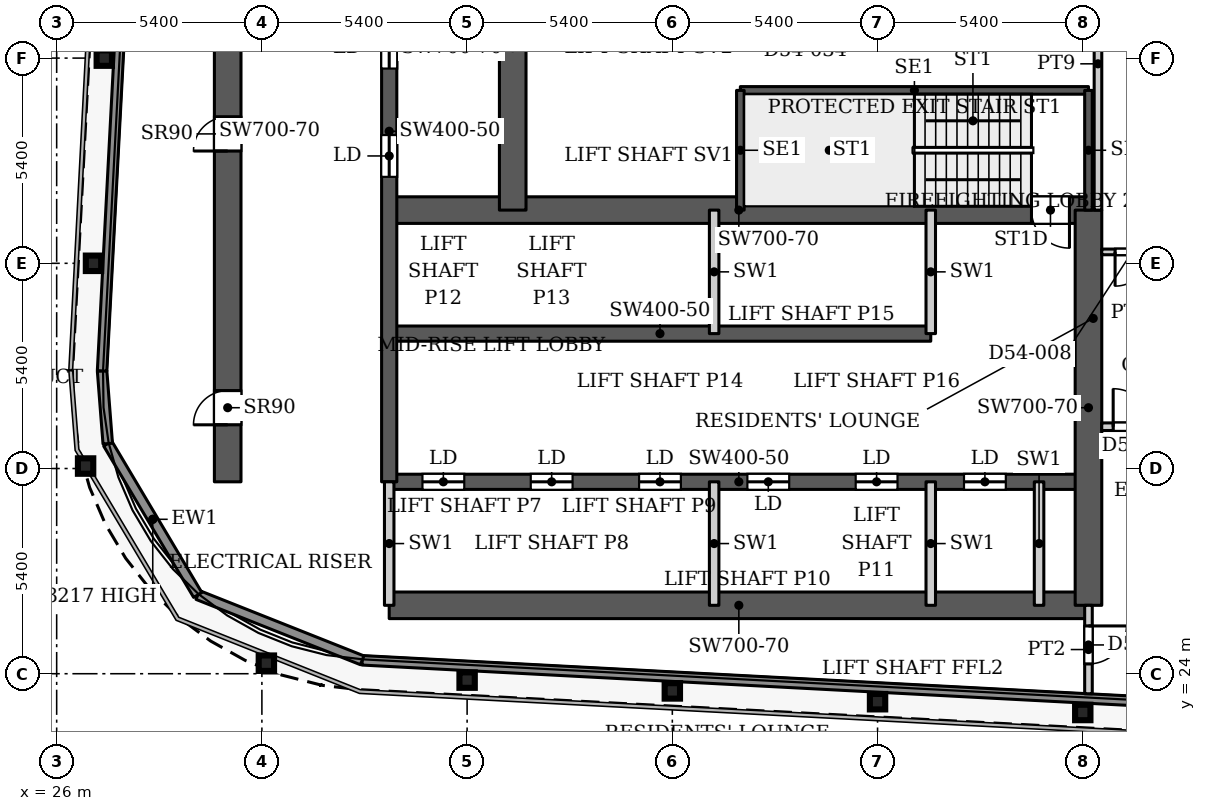
"""IFC4 building model, lengths in metres.
Left out: names, types, materials, properties, quantities, classifications, styles, units other than length and angle.
Written with IfcOpenShell. Run it as: python <this file> out.ifc"""

import sys

from ifc_helpers import new_model, si_unit, direction, frame, frame_2d, origin, origin_2d, place, context, subcontext, project, spatial, rectangle, i_section, extrude, source, transform, mapped, element, fill, save


model = new_model("IFC4")
c1 = context("Model", 3, precision=1e-05, world=origin(), true_north=direction((0.0, 1.0)))
c2 = subcontext(c1, "Body", "Model", "MODEL_VIEW")
j1 = project(units=[si_unit("LENGTHUNIT", "METRE"), si_unit("PLANEANGLEUNIT", "RADIAN")], contexts=[c1])
p1 = place(None, origin())
s1 = spatial("IfcSite", under=j1, at=p1, CompositionType="ELEMENT")
p2 = place(p1, origin())
s2 = spatial("IfcBuilding", under=s1, at=p2, CompositionType="ELEMENT")
p3 = place(p2, frame((0.0, 0.0, 231.8)))
s3 = spatial("IfcBuildingStorey", under=s2, at=p3, CompositionType="ELEMENT", Elevation=231.8)
for number, where, z_axis, x_axis in (
    (1, (53.0, 22.98, 0.0), (0.0, 0.0, 1.0), (1.0, 0.0, 0.0)),
    (2, (47.6, 23.264, 0.0), (0.0, 0.0, 1.0), (1.0, 0.0, 0.0)),
    (3, (42.2, 23.548, 0.0), (0.0, 0.0, 1.0), (1.0, 0.0, 0.0)),
    (4, (36.8, 23.832, 0.0), (0.0, 0.0, 1.0), (1.0, 0.0, 0.0)),
    (5, (31.518, 24.277, 0.0), (0.0, 0.0, 1.0), (1.0, 0.0, 0.0)),
    (6, (26.761, 29.465, 0.0), (0.0, 0.0, 1.0), (1.0, 0.0, 0.0)),
    (7, (26.969, 34.8, 0.0), (0.0, 0.0, 1.0), (1.0, 0.0, 0.0)),
    (8, (27.253, 40.2, 0.0), (0.0, 0.0, 1.0), (1.0, 0.0, 0.0)),
):
    element("IfcColumn", number, at=place(p3, frame(where, z_axis=z_axis, x_axis=x_axis)), inside=s3, PredefinedType="COLUMN", context=c2, shape_type="SweptSolid", body=[
        extrude(i_section(OverallWidth=0.404, OverallDepth=0.407, WebThickness=0.027, FlangeThickness=0.044, FilletRadius=0.012, at=origin_2d()), origin(), (0.0, 0.0, 1.0), 3.9),
    ])
p4 = place(p3, frame((34.75, 25.8, 0.0), z_axis=(0.0, 0.0, 1.0), x_axis=(1.0, 0.0, 0.0)))
e9 = element("IfcWall", 9, at=p4, inside=s3, PredefinedType="SHEAR", context=c2, shape_type="SweptSolid", body=[
    extrude(rectangle(XDim=18.4, YDim=0.7, at=frame_2d((9.2, 0.0))), origin(), (0.0, 0.0, 1.0), 3.9),
])
p5 = place(p3, frame((34.75, 29.05, 0.0), z_axis=(0.0, 0.0, 1.0), x_axis=(1.0, 0.0, 0.0)))
e10 = element("IfcWall", 10, at=p5, inside=s3, PredefinedType="SHEAR", context=c2, shape_type="SweptSolid", body=[
    extrude(rectangle(XDim=18.4, YDim=0.4, at=frame_2d((9.2, 0.0))), origin(), (0.0, 0.0, 1.0), 3.9),
])
p6 = place(p5, frame((0.875, 0.0, 0.0)))
e11 = element("IfcOpeningElement", 11, at=p6, cuts=e10, PredefinedType="OPENING", context=c2, shape_type="SweptSolid", body=[
    extrude(rectangle(XDim=1.1, YDim=2.2, at=frame_2d((0.55, 1.1))), frame((0.0, 0.21, 0.0), z_axis=(0.0, -1.0, 0.0), x_axis=(1.0, 0.0, 0.0)), (0.0, 0.0, 1.0), 0.42),
])
p7 = place(p5, frame((3.725, 0.0, 0.0)))
e12 = element("IfcOpeningElement", 12, at=p7, cuts=e10, PredefinedType="OPENING", context=c2, shape_type="SweptSolid", body=[
    extrude(rectangle(XDim=1.1, YDim=2.2, at=frame_2d((0.55, 1.1))), frame((0.0, 0.21, 0.0), z_axis=(0.0, -1.0, 0.0), x_axis=(1.0, 0.0, 0.0)), (0.0, 0.0, 1.0), 0.42),
])
p8 = place(p5, frame((6.575, 0.0, 0.0)))
e13 = element("IfcOpeningElement", 13, at=p8, cuts=e10, PredefinedType="OPENING", context=c2, shape_type="SweptSolid", body=[
    extrude(rectangle(XDim=1.1, YDim=2.2, at=frame_2d((0.55, 1.1))), frame((0.0, 0.21, 0.0), z_axis=(0.0, -1.0, 0.0), x_axis=(1.0, 0.0, 0.0)), (0.0, 0.0, 1.0), 0.42),
])
p9 = place(p5, frame((9.425, 0.0, 0.0)))
e14 = element("IfcOpeningElement", 14, at=p9, cuts=e10, PredefinedType="OPENING", context=c2, shape_type="SweptSolid", body=[
    extrude(rectangle(XDim=1.1, YDim=2.2, at=frame_2d((0.55, 1.1))), frame((0.0, 0.21, 0.0), z_axis=(0.0, -1.0, 0.0), x_axis=(1.0, 0.0, 0.0)), (0.0, 0.0, 1.0), 0.42),
])
p10 = place(p5, frame((12.275, 0.0, 0.0)))
e15 = element("IfcOpeningElement", 15, at=p10, cuts=e10, PredefinedType="OPENING", context=c2, shape_type="SweptSolid", body=[
    extrude(rectangle(XDim=1.1, YDim=2.2, at=frame_2d((0.55, 1.1))), frame((0.0, 0.21, 0.0), z_axis=(0.0, -1.0, 0.0), x_axis=(1.0, 0.0, 0.0)), (0.0, 0.0, 1.0), 0.42),
])
p11 = place(p5, frame((15.125, 0.0, 0.0)))
e16 = element("IfcOpeningElement", 16, at=p11, cuts=e10, PredefinedType="OPENING", context=c2, shape_type="SweptSolid", body=[
    extrude(rectangle(XDim=1.1, YDim=2.2, at=frame_2d((0.55, 1.1))), frame((0.0, 0.21, 0.0), z_axis=(0.0, -1.0, 0.0), x_axis=(1.0, 0.0, 0.0)), (0.0, 0.0, 1.0), 0.42),
])
p12 = place(p3, frame((34.75, 32.95, 0.0), z_axis=(0.0, 0.0, 1.0), x_axis=(1.0, 0.0, 0.0)))
e17 = element("IfcWall", 17, at=p12, inside=s3, PredefinedType="SHEAR", context=c2, shape_type="SweptSolid", body=[
    extrude(rectangle(XDim=14.25, YDim=0.4, at=frame_2d((7.125, 0.0))), origin(), (0.0, 0.0, 1.0), 3.9),
])
p13 = place(p3, frame((34.75, 36.2, 0.0), z_axis=(0.0, 0.0, 1.0), x_axis=(1.0, 0.0, 0.0)))
e18 = element("IfcWall", 18, at=p13, inside=s3, PredefinedType="SHEAR", context=c2, shape_type="SweptSolid", body=[
    extrude(rectangle(XDim=18.4, YDim=0.7, at=frame_2d((9.2, 0.0))), origin(), (0.0, 0.0, 1.0), 3.9),
])
p14 = place(p13, frame((16.9, 0.0, 0.0)))
e19 = element("IfcOpeningElement", 19, at=p14, cuts=e18, PredefinedType="OPENING", context=c2, shape_type="SweptSolid", body=[
    extrude(rectangle(XDim=1.0, YDim=2.2, at=frame_2d((0.5, 1.1))), frame((0.0, 0.36, 0.0), z_axis=(0.0, -1.0, 0.0), x_axis=(1.0, 0.0, 0.0)), (0.0, 0.0, 1.0), 0.72),
])
p15 = place(p3, frame((34.75, 29.05, 0.0), z_axis=(0.0, 0.0, 1.0), x_axis=(0.0, 1.0, 0.0)))
e20 = element("IfcWall", 20, at=p15, inside=s3, PredefinedType="SHEAR", context=c2, shape_type="SweptSolid", body=[
    extrude(rectangle(XDim=18.45, YDim=0.4, at=frame_2d((9.225, 0.0))), origin(), (0.0, 0.0, 1.0), 3.9),
])
p16 = place(p15, frame((8.025, 0.0, 0.0)))
e21 = element("IfcOpeningElement", 21, at=p16, cuts=e20, PredefinedType="OPENING", context=c2, shape_type="SweptSolid", body=[
    extrude(rectangle(XDim=1.1, YDim=2.2, at=frame_2d((0.55, 1.1))), frame((0.0, 0.21, 0.0), z_axis=(0.0, -1.0, 0.0), x_axis=(1.0, 0.0, 0.0)), (0.0, 0.0, 1.0), 0.42),
])
p17 = place(p15, frame((10.875, 0.0, 0.0)))
e22 = element("IfcOpeningElement", 22, at=p17, cuts=e20, PredefinedType="OPENING", context=c2, shape_type="SweptSolid", body=[
    extrude(rectangle(XDim=1.1, YDim=2.2, at=frame_2d((0.55, 1.1))), frame((0.0, 0.21, 0.0), z_axis=(0.0, -1.0, 0.0), x_axis=(1.0, 0.0, 0.0)), (0.0, 0.0, 1.0), 0.42),
])
p18 = place(p15, frame((13.725, 0.0, 0.0)))
e23 = element("IfcOpeningElement", 23, at=p18, cuts=e20, PredefinedType="OPENING", context=c2, shape_type="SweptSolid", body=[
    extrude(rectangle(XDim=1.1, YDim=2.2, at=frame_2d((0.55, 1.1))), frame((0.0, 0.21, 0.0), z_axis=(0.0, -1.0, 0.0), x_axis=(1.0, 0.0, 0.0)), (0.0, 0.0, 1.0), 0.42),
])
p19 = place(p15, frame((15.95, 0.0, 0.0)))
e24 = element("IfcOpeningElement", 24, at=p19, cuts=e20, PredefinedType="OPENING", context=c2, shape_type="SweptSolid", body=[
    extrude(rectangle(XDim=1.1, YDim=2.2, at=frame_2d((0.55, 1.1))), frame((0.0, 0.21, 0.0), z_axis=(0.0, -1.0, 0.0), x_axis=(1.0, 0.0, 0.0)), (0.0, 0.0, 1.0), 0.42),
])
p20 = place(p3, frame((38.0, 36.2, 0.0), z_axis=(0.0, 0.0, 1.0), x_axis=(0.0, 1.0, 0.0)))
e25 = element("IfcWall", 25, at=p20, inside=s3, PredefinedType="SHEAR", context=c2, shape_type="SweptSolid", body=[
    extrude(rectangle(XDim=8.55, YDim=0.7, at=frame_2d((4.275, 0.0))), origin(), (0.0, 0.0, 1.0), 3.9),
])
p21 = place(p3, frame((30.5, 29.05, 0.0), z_axis=(0.0, 0.0, 1.0), x_axis=(0.0, 1.0, 0.0)))
e26 = element("IfcWall", 26, at=p21, inside=s3, PredefinedType="SHEAR", context=c2, shape_type="SweptSolid", body=[
    extrude(rectangle(XDim=18.45, YDim=0.7, at=frame_2d((9.225, 0.0))), origin(), (0.0, 0.0, 1.0), 3.9),
])
p22 = place(p21, frame((1.5, 0.0, 0.0)))
e27 = element("IfcOpeningElement", 27, at=p22, cuts=e26, PredefinedType="OPENING", context=c2, shape_type="SweptSolid", body=[
    extrude(rectangle(XDim=0.9, YDim=2.2, at=frame_2d((0.45, 1.1))), frame((0.0, 0.36, 0.0), z_axis=(0.0, -1.0, 0.0), x_axis=(1.0, 0.0, 0.0)), (0.0, 0.0, 1.0), 0.72),
])
p23 = place(p21, frame((8.705, 0.0, 0.0)))
e28 = element("IfcOpeningElement", 28, at=p23, cuts=e26, PredefinedType="OPENING", context=c2, shape_type="SweptSolid", body=[
    extrude(rectangle(XDim=0.9, YDim=2.2, at=frame_2d((0.45, 1.1))), frame((0.0, 0.36, 0.0), z_axis=(0.0, -1.0, 0.0), x_axis=(1.0, 0.0, 0.0)), (0.0, 0.0, 1.0), 0.72),
])
p24 = place(p3, frame((53.15, 25.8, 0.0), z_axis=(0.0, 0.0, 1.0), x_axis=(0.0, 1.0, 0.0)))
e29 = element("IfcWall", 29, at=p24, inside=s3, PredefinedType="SHEAR", context=c2, shape_type="SweptSolid", body=[
    extrude(rectangle(XDim=10.4, YDim=0.7, at=frame_2d((5.2, 0.0))), origin(), (0.0, 0.0, 1.0), 3.9),
])
p25 = place(p3, frame((84.386, 21.703, 0.0), z_axis=(0.0, 0.0, 1.0), x_axis=(-0.998617508267, 0.05256493302, 0.0)))
e30 = element("IfcWall", 30, at=p25, inside=s3, PredefinedType="SOLIDWALL", context=c2, shape_type="SweptSolid", body=[
    extrude(rectangle(XDim=50.417, YDim=0.25, at=frame_2d((25.208, 0.0))), origin(), (0.0, 0.0, 1.0), 3.75),
])
p26 = place(p3, frame((34.039, 24.353, 0.0), z_axis=(0.0, 0.0, 1.0), x_axis=(-0.929352825399, 0.369192803184, 0.0)))
e31 = element("IfcWall", 31, at=p26, inside=s3, PredefinedType="SOLIDWALL", context=c2, shape_type="SweptSolid", body=[
    extrude(rectangle(XDim=4.656, YDim=0.25, at=frame_2d((2.328, 0.0))), origin(), (0.0, 0.0, 1.0), 3.75),
])
p27 = place(p3, frame((29.712, 26.072, 0.0), z_axis=(0.0, 0.0, 1.0), x_axis=(-0.511028049012, 0.859564036662, 0.0)))
e32 = element("IfcWall", 32, at=p27, inside=s3, PredefinedType="SOLIDWALL", context=c2, shape_type="SweptSolid", body=[
    extrude(rectangle(XDim=4.634, YDim=0.25, at=frame_2d((2.317, 0.0))), origin(), (0.0, 0.0, 1.0), 3.217),
])
p28 = place(p3, frame((27.344, 30.055, 0.0), z_axis=(0.0, 0.0, 1.0), x_axis=(-0.077571675317, 0.99698677784, 0.0)))
e33 = element("IfcWall", 33, at=p28, inside=s3, PredefinedType="SOLIDWALL", context=c2, shape_type="SweptSolid", body=[
    extrude(rectangle(XDim=1.92, YDim=0.25, at=frame_2d((0.96, 0.0))), origin(), (0.0, 0.0, 1.0), 3.75),
])
p29 = place(p3, frame((27.195, 31.969, 0.0), z_axis=(0.0, 0.0, 1.0), x_axis=(0.052555284099, 0.998618016117, 0.0)))
e34 = element("IfcWall", 34, at=p29, inside=s3, PredefinedType="SOLIDWALL", context=c2, shape_type="SweptSolid", body=[
    extrude(rectangle(XDim=61.38, YDim=0.25, at=frame_2d((30.69, 0.0))), origin(), (0.0, 0.0, 1.0), 3.75),
])
p30 = place(p3, frame((43.99, 39.35, 0.0), z_axis=(0.0, 0.0, 1.0), x_axis=(1.0, 0.0, 0.0)))
e35 = element("IfcWall", 35, at=p30, inside=s3, PredefinedType="SHEAR", context=c2, shape_type="SweptSolid", body=[
    extrude(rectangle(XDim=9.16, YDim=0.2, at=frame_2d((4.58, 0.0))), origin(), (0.0, 0.0, 1.0), 3.9),
])
for number, where, z_axis, x_axis in (
    (36, (43.99, 36.2, 0.0), (0.0, 0.0, 1.0), (0.0, 1.0, 0.0)),
    (37, (53.15, 36.2, 0.0), (0.0, 0.0, 1.0), (0.0, 1.0, 0.0)),
):
    element("IfcWall", number, at=place(p3, frame(where, z_axis=z_axis, x_axis=x_axis)), inside=s3, PredefinedType="SHEAR", context=c2, shape_type="SweptSolid", body=[
        extrude(rectangle(XDim=3.15, YDim=0.2, at=frame_2d((1.575, 0.0))), origin(), (0.0, 0.0, 1.0), 3.9),
    ])
for number, where, z_axis, x_axis in (
    (38, (34.75, 25.8, 0.0), (0.0, 0.0, 1.0), (0.0, 1.0, 0.0)),
    (39, (43.3, 25.8, 0.0), (0.0, 0.0, 1.0), (0.0, 1.0, 0.0)),
    (40, (43.3, 32.95, 0.0), (0.0, 0.0, 1.0), (0.0, 1.0, 0.0)),
    (41, (49.0, 25.8, 0.0), (0.0, 0.0, 1.0), (0.0, 1.0, 0.0)),
    (42, (49.0, 32.95, 0.0), (0.0, 0.0, 1.0), (0.0, 1.0, 0.0)),
    (43, (51.85, 25.8, 0.0), (0.0, 0.0, 1.0), (0.0, 1.0, 0.0)),
):
    element("IfcWall", number, at=place(p3, frame(where, z_axis=z_axis, x_axis=x_axis)), inside=s3, PredefinedType="PARTITIONING", context=c2, shape_type="SweptSolid", body=[
        extrude(rectangle(XDim=3.25, YDim=0.25, at=frame_2d((1.625, 0.0))), origin(), (0.0, 0.0, 1.0), 3.9),
    ])
p31 = place(p3, frame((53.15, 23.472, 0.0), z_axis=(0.0, 0.0, 1.0), x_axis=(0.0, 1.0, 0.0)))
e44 = element("IfcWall", 44, at=p31, inside=s3, PredefinedType="PARTITIONING", context=c2, shape_type="SweptSolid", body=[
    extrude(rectangle(XDim=2.328, YDim=0.2, at=frame_2d((1.164, 0.0))), origin(), (0.0, 0.0, 1.0), 3.6),
])
p32 = place(p31, frame((0.785, 0.0, 0.0)))
e45 = element("IfcOpeningElement", 45, at=p32, cuts=e44, PredefinedType="OPENING", context=c2, shape_type="SweptSolid", body=[
    extrude(rectangle(XDim=1.0, YDim=2.1, at=frame_2d((0.5, 1.05))), frame((0.0, 0.11, 0.0), z_axis=(0.0, -1.0, 0.0), x_axis=(1.0, 0.0, 0.0)), (0.0, 0.0, 1.0), 0.22),
])
p33 = place(p3, frame((53.4, 36.199, 0.0), z_axis=(0.0, 0.0, 1.0), x_axis=(0.0, 1.0, 0.0)))
e46 = element("IfcWall", 46, at=p33, inside=s3, PredefinedType="PARTITIONING", context=c2, shape_type="SweptSolid", body=[
    extrude(rectangle(XDim=7.701, YDim=0.2, at=frame_2d((3.851, 0.0))), origin(), (0.0, 0.0, 1.0), 3.6),
])
p34 = place(p3, frame((53.499, 30.5, 0.0), z_axis=(0.0, 0.0, 1.0), x_axis=(1.0, 0.0, 0.0)))
e47 = element("IfcWall", 47, at=p34, inside=s3, PredefinedType="PARTITIONING", context=c2, shape_type="SweptSolid", body=[
    extrude(rectangle(XDim=28.401, YDim=0.2, at=frame_2d((14.2, 0.0))), origin(), (0.0, 0.0, 1.0), 3.6),
])
p35 = place(p34, frame((0.301, 0.0, 0.0)))
e48 = element("IfcOpeningElement", 48, at=p35, cuts=e47, PredefinedType="OPENING", context=c2, shape_type="SweptSolid", body=[
    extrude(rectangle(XDim=1.0, YDim=2.1, at=frame_2d((0.5, 1.05))), frame((0.0, 0.11, 0.0), z_axis=(0.0, -1.0, 0.0), x_axis=(1.0, 0.0, 0.0)), (0.0, 0.0, 1.0), 0.22),
])
p36 = place(p34, frame((18.151, 0.0, 0.0)))
e49 = element("IfcOpeningElement", 49, at=p36, cuts=e47, PredefinedType="OPENING", context=c2, shape_type="SweptSolid", body=[
    extrude(rectangle(XDim=1.0, YDim=2.1, at=frame_2d((0.5, 1.05))), frame((0.0, 0.11, 0.0), z_axis=(0.0, -1.0, 0.0), x_axis=(1.0, 0.0, 0.0)), (0.0, 0.0, 1.0), 0.22),
])
p37 = place(p34, frame((25.801, 0.0, 0.0)))
e50 = element("IfcOpeningElement", 50, at=p37, cuts=e47, PredefinedType="OPENING", context=c2, shape_type="SweptSolid", body=[
    extrude(rectangle(XDim=1.0, YDim=2.1, at=frame_2d((0.5, 1.05))), frame((0.0, 0.11, 0.0), z_axis=(0.0, -1.0, 0.0), x_axis=(1.0, 0.0, 0.0)), (0.0, 0.0, 1.0), 0.22),
])
p38 = place(p3, frame((53.499, 35.1, 0.0), z_axis=(0.0, 0.0, 1.0), x_axis=(1.0, 0.0, 0.0)))
e51 = element("IfcWall", 51, at=p38, inside=s3, PredefinedType="PARTITIONING", context=c2, shape_type="SweptSolid", body=[
    extrude(rectangle(XDim=11.501, YDim=0.15, at=frame_2d((5.75, 0.0))), origin(), (0.0, 0.0, 1.0), 3.6),
])
p39 = place(p38, frame((5.001, 0.0, 0.0)))
e52 = element("IfcOpeningElement", 52, at=p39, cuts=e51, PredefinedType="OPENING", context=c2, shape_type="SweptSolid", body=[
    extrude(rectangle(XDim=0.9, YDim=2.1, at=frame_2d((0.45, 1.05))), frame((0.0, 0.085, 0.0), z_axis=(0.0, -1.0, 0.0), x_axis=(1.0, 0.0, 0.0)), (0.0, 0.0, 1.0), 0.17),
])
p40 = place(p38, frame((8.851, 0.0, 0.0)))
e53 = element("IfcOpeningElement", 53, at=p40, cuts=e51, PredefinedType="OPENING", context=c2, shape_type="SweptSolid", body=[
    extrude(rectangle(XDim=1.0, YDim=2.1, at=frame_2d((0.5, 1.05))), frame((0.0, 0.085, 0.0), z_axis=(0.0, -1.0, 0.0), x_axis=(1.0, 0.0, 0.0)), (0.0, 0.0, 1.0), 0.17),
])
p41 = place(p38, frame((0.351, 0.0, 0.0)))
e54 = element("IfcOpeningElement", 54, at=p41, cuts=e51, PredefinedType="OPENING", context=c2, shape_type="SweptSolid", body=[
    extrude(rectangle(XDim=0.9, YDim=2.1, at=frame_2d((0.45, 1.05))), frame((0.0, 0.085, 0.0), z_axis=(0.0, -1.0, 0.0), x_axis=(1.0, 0.0, 0.0)), (0.0, 0.0, 1.0), 0.17),
])
m1 = source(origin(), c2, "Body", "SweptSolid", [
    extrude(rectangle(XDim=1.1, YDim=2.2, at=frame_2d((0.55, 1.1))), frame((0.0, 0.025, 0.0), z_axis=(0.0, -1.0, 0.0), x_axis=(1.0, 0.0, 0.0)), (0.0, 0.0, 1.0), 0.05),
])
p42 = place(p6, origin())
e55 = element("IfcDoor", 55, at=p42, inside=s3, OperationType="SLIDING_TO_LEFT", PredefinedType="DOOR", context=c2, shape_type="MappedRepresentation", body=[
    mapped(m1, transform((0.0, 0.0, 0.0), x_axis=(1.0, 0.0, 0.0), y_axis=(0.0, 1.0, 0.0), z_axis=(0.0, 0.0, 1.0), scale=1.0)),
])
fill(e11, e55)
p43 = place(p7, origin())
e56 = element("IfcDoor", 56, at=p43, inside=s3, OperationType="SLIDING_TO_LEFT", PredefinedType="DOOR", context=c2, shape_type="MappedRepresentation", body=[
    mapped(m1, transform((0.0, 0.0, 0.0), x_axis=(1.0, 0.0, 0.0), y_axis=(0.0, 1.0, 0.0), z_axis=(0.0, 0.0, 1.0), scale=1.0)),
])
fill(e12, e56)
p44 = place(p8, origin())
e57 = element("IfcDoor", 57, at=p44, inside=s3, OperationType="SLIDING_TO_LEFT", PredefinedType="DOOR", context=c2, shape_type="MappedRepresentation", body=[
    mapped(m1, transform((0.0, 0.0, 0.0), x_axis=(1.0, 0.0, 0.0), y_axis=(0.0, 1.0, 0.0), z_axis=(0.0, 0.0, 1.0), scale=1.0)),
])
fill(e13, e57)
p45 = place(p9, origin())
e58 = element("IfcDoor", 58, at=p45, inside=s3, OperationType="SLIDING_TO_LEFT", PredefinedType="DOOR", context=c2, shape_type="MappedRepresentation", body=[
    mapped(m1, transform((0.0, 0.0, 0.0), x_axis=(1.0, 0.0, 0.0), y_axis=(0.0, 1.0, 0.0), z_axis=(0.0, 0.0, 1.0), scale=1.0)),
])
fill(e14, e58)
p46 = place(p10, origin())
e59 = element("IfcDoor", 59, at=p46, inside=s3, OperationType="SLIDING_TO_LEFT", PredefinedType="DOOR", context=c2, shape_type="MappedRepresentation", body=[
    mapped(m1, transform((0.0, 0.0, 0.0), x_axis=(1.0, 0.0, 0.0), y_axis=(0.0, 1.0, 0.0), z_axis=(0.0, 0.0, 1.0), scale=1.0)),
])
fill(e15, e59)
p47 = place(p16, origin())
e60 = element("IfcDoor", 60, at=p47, inside=s3, OperationType="SLIDING_TO_LEFT", PredefinedType="DOOR", context=c2, shape_type="MappedRepresentation", body=[
    mapped(m1, transform((0.0, 0.0, 0.0), x_axis=(1.0, 0.0, 0.0), y_axis=(0.0, 1.0, 0.0), z_axis=(0.0, 0.0, 1.0), scale=1.0)),
])
fill(e21, e60)
p48 = place(p17, origin())
e61 = element("IfcDoor", 61, at=p48, inside=s3, OperationType="SLIDING_TO_LEFT", PredefinedType="DOOR", context=c2, shape_type="MappedRepresentation", body=[
    mapped(m1, transform((0.0, 0.0, 0.0), x_axis=(1.0, 0.0, 0.0), y_axis=(0.0, 1.0, 0.0), z_axis=(0.0, 0.0, 1.0), scale=1.0)),
])
fill(e22, e61)
p49 = place(p11, origin())
e62 = element("IfcDoor", 62, at=p49, inside=s3, OperationType="SLIDING_TO_LEFT", PredefinedType="DOOR", context=c2, shape_type="MappedRepresentation", body=[
    mapped(m1, transform((0.0, 0.0, 0.0), x_axis=(1.0, 0.0, 0.0), y_axis=(0.0, 1.0, 0.0), z_axis=(0.0, 0.0, 1.0), scale=1.0)),
])
fill(e16, e62)
m2 = source(origin(), c2, "Body", "SweptSolid", [
    extrude(rectangle(XDim=0.9, YDim=2.2, at=frame_2d((0.45, 1.1))), frame((0.0, 0.025, 0.0), z_axis=(0.0, -1.0, 0.0), x_axis=(1.0, 0.0, 0.0)), (0.0, 0.0, 1.0), 0.05),
])
p50 = place(p22, origin())
e63 = element("IfcDoor", 63, at=p50, inside=s3, OperationType="SINGLE_SWING_LEFT", PredefinedType="DOOR", context=c2, shape_type="MappedRepresentation", body=[
    mapped(m2, transform((0.0, 0.0, 0.0), x_axis=(1.0, 0.0, 0.0), y_axis=(0.0, 1.0, 0.0), z_axis=(0.0, 0.0, 1.0), scale=1.0)),
])
fill(e27, e63)
p51 = place(p23, origin())
e64 = element("IfcDoor", 64, at=p51, inside=s3, OperationType="SINGLE_SWING_LEFT", PredefinedType="DOOR", context=c2, shape_type="MappedRepresentation", body=[
    mapped(m2, transform((0.0, 0.0, 0.0), x_axis=(1.0, 0.0, 0.0), y_axis=(0.0, 1.0, 0.0), z_axis=(0.0, 0.0, 1.0), scale=1.0)),
])
fill(e28, e64)
m3 = source(origin(), c2, "Body", "SweptSolid", [
    extrude(rectangle(XDim=1.0, YDim=2.2, at=frame_2d((0.5, 1.1))), frame((0.0, 0.025, 0.0), z_axis=(0.0, -1.0, 0.0), x_axis=(1.0, 0.0, 0.0)), (0.0, 0.0, 1.0), 0.05),
])
p52 = place(p14, origin())
e65 = element("IfcDoor", 65, at=p52, inside=s3, OperationType="SINGLE_SWING_RIGHT", PredefinedType="DOOR", context=c2, shape_type="MappedRepresentation", body=[
    mapped(m3, transform((0.0, 0.0, 0.0), x_axis=(1.0, 0.0, 0.0), y_axis=(0.0, 1.0, 0.0), z_axis=(0.0, 0.0, 1.0), scale=1.0)),
])
fill(e19, e65)
m4 = source(origin(), c2, "Body", "SweptSolid", [
    extrude(rectangle(XDim=1.0, YDim=2.1, at=frame_2d((0.5, 1.05))), frame((0.0, 0.025, 0.0), z_axis=(0.0, -1.0, 0.0), x_axis=(1.0, 0.0, 0.0)), (0.0, 0.0, 1.0), 0.05),
])
p53 = place(p35, origin())
e66 = element("IfcDoor", 66, at=p53, inside=s3, OperationType="SINGLE_SWING_LEFT", PredefinedType="DOOR", context=c2, shape_type="MappedRepresentation", body=[
    mapped(m4, transform((0.0, 0.0, 0.0), x_axis=(1.0, 0.0, 0.0), y_axis=(0.0, 1.0, 0.0), z_axis=(0.0, 0.0, 1.0), scale=1.0)),
])
fill(e48, e66)
m5 = source(origin(), c2, "Body", "SweptSolid", [
    extrude(rectangle(XDim=0.9, YDim=2.1, at=frame_2d((0.45, 1.05))), frame((0.0, 0.025, 0.0), z_axis=(0.0, -1.0, 0.0), x_axis=(1.0, 0.0, 0.0)), (0.0, 0.0, 1.0), 0.05),
])
p54 = place(p41, origin())
e67 = element("IfcDoor", 67, at=p54, inside=s3, OperationType="SINGLE_SWING_RIGHT", PredefinedType="DOOR", context=c2, shape_type="MappedRepresentation", body=[
    mapped(m5, transform((0.0, 0.0, 0.0), x_axis=(1.0, 0.0, 0.0), y_axis=(0.0, 1.0, 0.0), z_axis=(0.0, 0.0, 1.0), scale=1.0)),
])
fill(e54, e67)
m6 = source(origin(), c2, "Body", "SweptSolid", [
    extrude(rectangle(XDim=1.0, YDim=2.1, at=frame_2d((0.5, 1.05))), frame((0.0, 0.025, 0.0), z_axis=(0.0, -1.0, 0.0), x_axis=(1.0, 0.0, 0.0)), (0.0, 0.0, 1.0), 0.05),
])
p55 = place(p32, origin())
e68 = element("IfcDoor", 68, at=p55, inside=s3, OperationType="SINGLE_SWING_RIGHT", PredefinedType="DOOR", context=c2, shape_type="MappedRepresentation", body=[
    mapped(m6, transform((0.0, 0.0, 0.0), x_axis=(1.0, 0.0, 0.0), y_axis=(0.0, 1.0, 0.0), z_axis=(0.0, 0.0, 1.0), scale=1.0)),
])
fill(e45, e68)
save(model, sys.argv[1])
